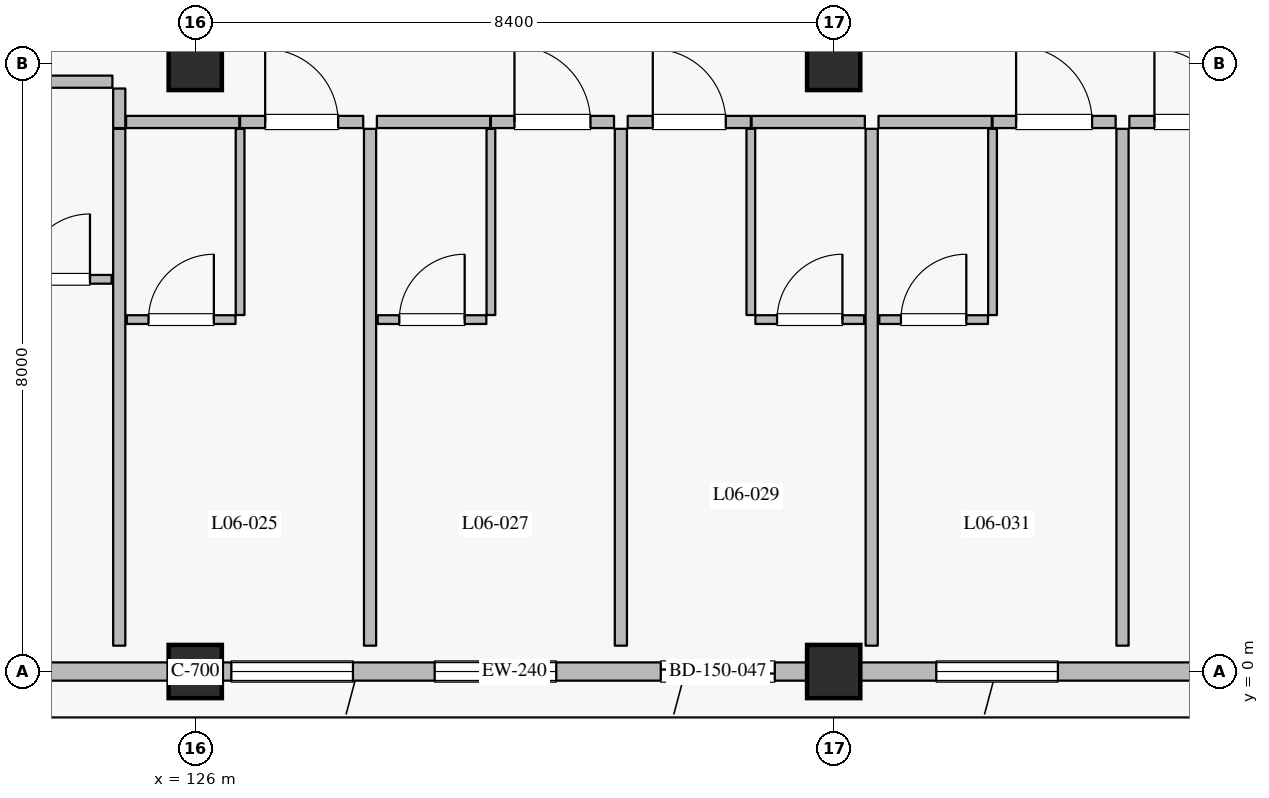
"""IFC4 building model, lengths in metres.
Left out: names, types, materials, properties, quantities, classifications, styles, units other than length and angle.
Written with IfcOpenShell. Run it as: python <this file> out.ifc"""

import sys

from ifc_helpers import new_model, si_unit, direction, frame, frame_2d, origin, origin_2d, place, context, subcontext, project, spatial, rectangle, extrude, element, fill, save


model = new_model("IFC4")
c1 = context("Model", 3, precision=1e-05, world=origin(), true_north=direction((0.0, 1.0)))
c2 = subcontext(c1, "Body", "Model", "MODEL_VIEW")
j1 = project(units=[si_unit("LENGTHUNIT", "METRE"), si_unit("PLANEANGLEUNIT", "RADIAN")], contexts=[c1])
p1 = place(None, origin())
s1 = spatial("IfcSite", under=j1, at=p1, CompositionType="ELEMENT")
p2 = place(p1, origin())
s2 = spatial("IfcBuilding", under=s1, at=p2, CompositionType="ELEMENT")
p3 = place(p2, frame((0.0, 0.0, 28.8)))
s3 = spatial("IfcBuildingStorey", under=s2, at=p3, CompositionType="ELEMENT", Elevation=28.8)
for number, where, z_axis, x_axis in (
    (1, (126.0, 0.0, 0.0), (0.0, 0.0, 1.0), (1.0, 0.0, 0.0)),
    (2, (134.4, 0.0, 0.0), (0.0, 0.0, 1.0), (1.0, 0.0, 0.0)),
    (3, (126.0, 8.0, 0.0), (0.0, 0.0, 1.0), (1.0, 0.0, 0.0)),
    (4, (134.4, 8.0, 0.0), (0.0, 0.0, 1.0), (1.0, 0.0, 0.0)),
):
    element("IfcColumn", number, at=place(p3, frame(where, z_axis=z_axis, x_axis=x_axis)), inside=s3, PredefinedType="COLUMN", context=c2, shape_type="SweptSolid", body=[
        extrude(rectangle(XDim=0.7, YDim=0.7, at=origin_2d()), origin(), (0.0, 0.0, 1.0), 3.6),
    ])
p4 = place(p3, frame((125.65, 0.0, 0.0), z_axis=(0.0, 0.0, 1.0), x_axis=(-1.0, 0.0, 0.0)))
e5 = element("IfcWall", 5, at=p4, inside=s3, PredefinedType="SOLIDWALL", context=c2, shape_type="SweptSolid", body=[
    extrude(rectangle(XDim=7.7, YDim=0.24, at=frame_2d((3.85, 0.0))), origin(), (0.0, 0.0, 1.0), 2.93),
])
p5 = place(p4, frame((1.55, 0.0, 0.0)))
e6 = element("IfcOpeningElement", 6, at=p5, cuts=e5, PredefinedType="OPENING", context=c2, shape_type="SweptSolid", body=[
    extrude(rectangle(XDim=1.5, YDim=2.25, at=frame_2d((0.75, 1.125))), frame((0.0, 0.13, 0.0), z_axis=(0.0, -1.0, 0.0), x_axis=(1.0, 0.0, 0.0)), (0.0, 0.0, 1.0), 0.26),
])
p6 = place(p4, frame((4.8, 0.0, 0.8)))
e7 = element("IfcOpeningElement", 7, at=p6, cuts=e5, PredefinedType="OPENING", context=c2, shape_type="SweptSolid", body=[
    extrude(rectangle(XDim=1.6, YDim=1.6, at=frame_2d((0.8, 0.8))), frame((0.0, 0.13, 0.0), z_axis=(0.0, -1.0, 0.0), x_axis=(1.0, 0.0, 0.0)), (0.0, 0.0, 1.0), 0.26),
])
p7 = place(p3, frame((134.05, 0.0, 0.0), z_axis=(0.0, 0.0, 1.0), x_axis=(-1.0, 0.0, 0.0)))
e8 = element("IfcWall", 8, at=p7, inside=s3, PredefinedType="SOLIDWALL", context=c2, shape_type="SweptSolid", body=[
    extrude(rectangle(XDim=7.7, YDim=0.24, at=frame_2d((3.85, 0.0))), origin(), (0.0, 0.0, 1.0), 2.93),
])
p8 = place(p7, frame((0.425, 0.0, 0.0)))
e9 = element("IfcOpeningElement", 9, at=p8, cuts=e8, PredefinedType="OPENING", context=c2, shape_type="SweptSolid", body=[
    extrude(rectangle(XDim=1.5, YDim=2.25, at=frame_2d((0.75, 1.125))), frame((0.0, 0.13, 0.0), z_axis=(0.0, -1.0, 0.0), x_axis=(1.0, 0.0, 0.0)), (0.0, 0.0, 1.0), 0.26),
])
p9 = place(p7, frame((3.3, 0.0, 0.8)))
e10 = element("IfcOpeningElement", 10, at=p9, cuts=e8, PredefinedType="OPENING", context=c2, shape_type="SweptSolid", body=[
    extrude(rectangle(XDim=1.6, YDim=1.6, at=frame_2d((0.8, 0.8))), frame((0.0, 0.13, 0.0), z_axis=(0.0, -1.0, 0.0), x_axis=(1.0, 0.0, 0.0)), (0.0, 0.0, 1.0), 0.26),
])
p10 = place(p7, frame((5.975, 0.0, 0.8)))
e11 = element("IfcOpeningElement", 11, at=p10, cuts=e8, PredefinedType="OPENING", context=c2, shape_type="SweptSolid", body=[
    extrude(rectangle(XDim=1.6, YDim=1.6, at=frame_2d((0.8, 0.8))), frame((0.0, 0.13, 0.0), z_axis=(0.0, -1.0, 0.0), x_axis=(1.0, 0.0, 0.0)), (0.0, 0.0, 1.0), 0.26),
])
p11 = place(p3, frame((142.45, 0.0, 0.0), z_axis=(0.0, 0.0, 1.0), x_axis=(-1.0, 0.0, 0.0)))
e12 = element("IfcWall", 12, at=p11, inside=s3, PredefinedType="SOLIDWALL", context=c2, shape_type="SweptSolid", body=[
    extrude(rectangle(XDim=7.7, YDim=0.24, at=frame_2d((3.85, 0.0))), origin(), (0.0, 0.0, 1.0), 2.93),
])
p12 = place(p11, frame((1.85, 0.0, 0.0)))
e13 = element("IfcOpeningElement", 13, at=p12, cuts=e12, PredefinedType="OPENING", context=c2, shape_type="SweptSolid", body=[
    extrude(rectangle(XDim=1.5, YDim=2.25, at=frame_2d((0.75, 1.125))), frame((0.0, 0.13, 0.0), z_axis=(0.0, -1.0, 0.0), x_axis=(1.0, 0.0, 0.0)), (0.0, 0.0, 1.0), 0.26),
])
p13 = place(p11, frame((5.1, 0.0, 0.8)))
e14 = element("IfcOpeningElement", 14, at=p13, cuts=e12, PredefinedType="OPENING", context=c2, shape_type="SweptSolid", body=[
    extrude(rectangle(XDim=1.6, YDim=1.6, at=frame_2d((0.8, 0.8))), frame((0.0, 0.13, 0.0), z_axis=(0.0, -1.0, 0.0), x_axis=(1.0, 0.0, 0.0)), (0.0, 0.0, 1.0), 0.26),
])
p14 = place(p3, frame((123.42, 7.76, 0.0), z_axis=(0.0, 0.0, 1.0), x_axis=(1.0, 0.0, 0.0)))
e15 = element("IfcWall", 15, at=p14, inside=s3, PredefinedType="PARTITIONING", context=c2, shape_type="SweptSolid", body=[
    extrude(rectangle(XDim=1.49, YDim=0.16, at=frame_2d((0.745, 0.0))), origin(), (0.0, 0.0, 1.0), 3.365),
])
p15 = place(p3, frame((123.47, 5.16, 0.0), z_axis=(0.0, 0.0, 1.0), x_axis=(1.0, 0.0, 0.0)))
e16 = element("IfcWall", 16, at=p15, inside=s3, PredefinedType="PARTITIONING", context=c2, shape_type="SweptSolid", body=[
    extrude(rectangle(XDim=1.43, YDim=0.115, at=frame_2d((0.715, 0.0))), origin(), (0.0, 0.0, 1.0), 3.365),
])
p16 = place(p15, frame((0.285, 0.0, 0.0)))
e17 = element("IfcOpeningElement", 17, at=p16, cuts=e16, PredefinedType="OPENING", context=c2, shape_type="SweptSolid", body=[
    extrude(rectangle(XDim=0.86, YDim=2.12, at=frame_2d((0.43, 1.06))), frame((0.0, 0.067, 0.0), z_axis=(0.0, -1.0, 0.0), x_axis=(1.0, 0.0, 0.0)), (0.0, 0.0, 1.0), 0.135),
])
p17 = place(p3, frame((125.0, 7.15, 0.0), z_axis=(0.0, 0.0, 1.0), x_axis=(0.0, 1.0, 0.0)))
e18 = element("IfcWall", 18, at=p17, inside=s3, PredefinedType="PARTITIONING", context=c2, shape_type="SweptSolid", body=[
    extrude(rectangle(XDim=0.52, YDim=0.16, at=frame_2d((0.26, 0.0))), origin(), (0.0, 0.0, 1.0), 3.365),
])
p18 = place(p3, frame((125.09, 7.23, 0.0), z_axis=(0.0, 0.0, 1.0), x_axis=(1.0, 0.0, 0.0)))
e19 = element("IfcWall", 19, at=p18, inside=s3, PredefinedType="PARTITIONING", context=c2, shape_type="SweptSolid", body=[
    extrude(rectangle(XDim=1.49, YDim=0.16, at=frame_2d((0.745, 0.0))), origin(), (0.0, 0.0, 1.0), 3.365),
])
p19 = place(p3, frame((126.59, 7.23, 0.0), z_axis=(0.0, 0.0, 1.0), x_axis=(1.0, 0.0, 0.0)))
e20 = element("IfcWall", 20, at=p19, inside=s3, PredefinedType="PARTITIONING", context=c2, shape_type="SweptSolid", body=[
    extrude(rectangle(XDim=1.62, YDim=0.16, at=frame_2d((0.81, 0.0))), origin(), (0.0, 0.0, 1.0), 3.365),
])
p20 = place(p19, frame((0.33, 0.0, 0.0)))
e21 = element("IfcOpeningElement", 21, at=p20, cuts=e20, PredefinedType="OPENING", context=c2, shape_type="SweptSolid", body=[
    extrude(rectangle(XDim=0.96, YDim=2.2, at=frame_2d((0.48, 1.1))), frame((0.0, 0.09, 0.0), z_axis=(0.0, -1.0, 0.0), x_axis=(1.0, 0.0, 0.0)), (0.0, 0.0, 1.0), 0.18),
])
p21 = place(p3, frame((126.59, 4.69, 0.0), z_axis=(0.0, 0.0, 1.0), x_axis=(0.0, 1.0, 0.0)))
e22 = element("IfcWall", 22, at=p21, inside=s3, PredefinedType="PARTITIONING", context=c2, shape_type="SweptSolid", body=[
    extrude(rectangle(XDim=2.45, YDim=0.115, at=frame_2d((1.225, 0.0))), origin(), (0.0, 0.0, 1.0), 3.365),
])
p22 = place(p3, frame((125.1, 4.63, 0.0), z_axis=(0.0, 0.0, 1.0), x_axis=(1.0, 0.0, 0.0)))
e23 = element("IfcWall", 23, at=p22, inside=s3, PredefinedType="PARTITIONING", context=c2, shape_type="SweptSolid", body=[
    extrude(rectangle(XDim=1.43, YDim=0.115, at=frame_2d((0.715, 0.0))), origin(), (0.0, 0.0, 1.0), 3.365),
])
p23 = place(p22, frame((0.285, 0.0, 0.0)))
e24 = element("IfcOpeningElement", 24, at=p23, cuts=e23, PredefinedType="OPENING", context=c2, shape_type="SweptSolid", body=[
    extrude(rectangle(XDim=0.86, YDim=2.12, at=frame_2d((0.43, 1.06))), frame((0.0, 0.067, 0.0), z_axis=(0.0, -1.0, 0.0), x_axis=(1.0, 0.0, 0.0)), (0.0, 0.0, 1.0), 0.135),
])
p24 = place(p3, frame((125.0, 0.34, 0.0), z_axis=(0.0, 0.0, 1.0), x_axis=(0.0, 1.0, 0.0)))
e25 = element("IfcWall", 25, at=p24, inside=s3, PredefinedType="PARTITIONING", context=c2, shape_type="SweptSolid", body=[
    extrude(rectangle(XDim=6.8, YDim=0.16, at=frame_2d((3.4, 0.0))), origin(), (0.0, 0.0, 1.0), 3.365),
])
p25 = place(p3, frame((128.39, 7.23, 0.0), z_axis=(0.0, 0.0, 1.0), x_axis=(1.0, 0.0, 0.0)))
e26 = element("IfcWall", 26, at=p25, inside=s3, PredefinedType="PARTITIONING", context=c2, shape_type="SweptSolid", body=[
    extrude(rectangle(XDim=1.49, YDim=0.16, at=frame_2d((0.745, 0.0))), origin(), (0.0, 0.0, 1.0), 3.365),
])
p26 = place(p3, frame((129.89, 7.23, 0.0), z_axis=(0.0, 0.0, 1.0), x_axis=(1.0, 0.0, 0.0)))
e27 = element("IfcWall", 27, at=p26, inside=s3, PredefinedType="PARTITIONING", context=c2, shape_type="SweptSolid", body=[
    extrude(rectangle(XDim=1.62, YDim=0.16, at=frame_2d((0.81, 0.0))), origin(), (0.0, 0.0, 1.0), 3.365),
])
p27 = place(p26, frame((0.31, 0.0, 0.0)))
e28 = element("IfcOpeningElement", 28, at=p27, cuts=e27, PredefinedType="OPENING", context=c2, shape_type="SweptSolid", body=[
    extrude(rectangle(XDim=1.0, YDim=2.25, at=frame_2d((0.5, 1.125))), frame((0.0, 0.09, 0.0), z_axis=(0.0, -1.0, 0.0), x_axis=(1.0, 0.0, 0.0)), (0.0, 0.0, 1.0), 0.18),
])
p28 = place(p3, frame((129.89, 4.69, 0.0), z_axis=(0.0, 0.0, 1.0), x_axis=(0.0, 1.0, 0.0)))
e29 = element("IfcWall", 29, at=p28, inside=s3, PredefinedType="PARTITIONING", context=c2, shape_type="SweptSolid", body=[
    extrude(rectangle(XDim=2.45, YDim=0.115, at=frame_2d((1.225, 0.0))), origin(), (0.0, 0.0, 1.0), 3.365),
])
p29 = place(p3, frame((128.4, 4.63, 0.0), z_axis=(0.0, 0.0, 1.0), x_axis=(1.0, 0.0, 0.0)))
e30 = element("IfcWall", 30, at=p29, inside=s3, PredefinedType="PARTITIONING", context=c2, shape_type="SweptSolid", body=[
    extrude(rectangle(XDim=1.43, YDim=0.115, at=frame_2d((0.715, 0.0))), origin(), (0.0, 0.0, 1.0), 3.365),
])
p30 = place(p29, frame((0.285, 0.0, 0.0)))
e31 = element("IfcOpeningElement", 31, at=p30, cuts=e30, PredefinedType="OPENING", context=c2, shape_type="SweptSolid", body=[
    extrude(rectangle(XDim=0.86, YDim=2.12, at=frame_2d((0.43, 1.06))), frame((0.0, 0.067, 0.0), z_axis=(0.0, -1.0, 0.0), x_axis=(1.0, 0.0, 0.0)), (0.0, 0.0, 1.0), 0.135),
])
p31 = place(p3, frame((128.3, 0.34, 0.0), z_axis=(0.0, 0.0, 1.0), x_axis=(0.0, 1.0, 0.0)))
e32 = element("IfcWall", 32, at=p31, inside=s3, PredefinedType="PARTITIONING", context=c2, shape_type="SweptSolid", body=[
    extrude(rectangle(XDim=6.8, YDim=0.16, at=frame_2d((3.4, 0.0))), origin(), (0.0, 0.0, 1.0), 3.365),
])
p32 = place(p3, frame((131.69, 7.23, 0.0), z_axis=(0.0, 0.0, 1.0), x_axis=(1.0, 0.0, 0.0)))
e33 = element("IfcWall", 33, at=p32, inside=s3, PredefinedType="PARTITIONING", context=c2, shape_type="SweptSolid", body=[
    extrude(rectangle(XDim=1.62, YDim=0.16, at=frame_2d((0.81, 0.0))), origin(), (0.0, 0.0, 1.0), 3.365),
])
p33 = place(p32, frame((0.33, 0.0, 0.0)))
e34 = element("IfcOpeningElement", 34, at=p33, cuts=e33, PredefinedType="OPENING", context=c2, shape_type="SweptSolid", body=[
    extrude(rectangle(XDim=0.96, YDim=2.2, at=frame_2d((0.48, 1.1))), frame((0.0, 0.09, 0.0), z_axis=(0.0, -1.0, 0.0), x_axis=(1.0, 0.0, 0.0)), (0.0, 0.0, 1.0), 0.18),
])
p34 = place(p3, frame((133.32, 7.23, 0.0), z_axis=(0.0, 0.0, 1.0), x_axis=(1.0, 0.0, 0.0)))
e35 = element("IfcWall", 35, at=p34, inside=s3, PredefinedType="PARTITIONING", context=c2, shape_type="SweptSolid", body=[
    extrude(rectangle(XDim=1.49, YDim=0.16, at=frame_2d((0.745, 0.0))), origin(), (0.0, 0.0, 1.0), 3.365),
])
p35 = place(p3, frame((133.31, 4.69, 0.0), z_axis=(0.0, 0.0, 1.0), x_axis=(0.0, 1.0, 0.0)))
e36 = element("IfcWall", 36, at=p35, inside=s3, PredefinedType="PARTITIONING", context=c2, shape_type="SweptSolid", body=[
    extrude(rectangle(XDim=2.45, YDim=0.115, at=frame_2d((1.225, 0.0))), origin(), (0.0, 0.0, 1.0), 3.365),
])
p36 = place(p3, frame((133.37, 4.63, 0.0), z_axis=(0.0, 0.0, 1.0), x_axis=(1.0, 0.0, 0.0)))
e37 = element("IfcWall", 37, at=p36, inside=s3, PredefinedType="PARTITIONING", context=c2, shape_type="SweptSolid", body=[
    extrude(rectangle(XDim=1.43, YDim=0.115, at=frame_2d((0.715, 0.0))), origin(), (0.0, 0.0, 1.0), 3.365),
])
p37 = place(p36, frame((0.285, 0.0, 0.0)))
e38 = element("IfcOpeningElement", 38, at=p37, cuts=e37, PredefinedType="OPENING", context=c2, shape_type="SweptSolid", body=[
    extrude(rectangle(XDim=0.86, YDim=2.12, at=frame_2d((0.43, 1.06))), frame((0.0, 0.067, 0.0), z_axis=(0.0, -1.0, 0.0), x_axis=(1.0, 0.0, 0.0)), (0.0, 0.0, 1.0), 0.135),
])
p38 = place(p3, frame((131.6, 0.34, 0.0), z_axis=(0.0, 0.0, 1.0), x_axis=(0.0, 1.0, 0.0)))
e39 = element("IfcWall", 39, at=p38, inside=s3, PredefinedType="PARTITIONING", context=c2, shape_type="SweptSolid", body=[
    extrude(rectangle(XDim=6.8, YDim=0.16, at=frame_2d((3.4, 0.0))), origin(), (0.0, 0.0, 1.0), 3.365),
])
p39 = place(p3, frame((134.99, 7.23, 0.0), z_axis=(0.0, 0.0, 1.0), x_axis=(1.0, 0.0, 0.0)))
e40 = element("IfcWall", 40, at=p39, inside=s3, PredefinedType="PARTITIONING", context=c2, shape_type="SweptSolid", body=[
    extrude(rectangle(XDim=1.49, YDim=0.16, at=frame_2d((0.745, 0.0))), origin(), (0.0, 0.0, 1.0), 3.365),
])
p40 = place(p3, frame((136.49, 7.23, 0.0), z_axis=(0.0, 0.0, 1.0), x_axis=(1.0, 0.0, 0.0)))
e41 = element("IfcWall", 41, at=p40, inside=s3, PredefinedType="PARTITIONING", context=c2, shape_type="SweptSolid", body=[
    extrude(rectangle(XDim=1.62, YDim=0.16, at=frame_2d((0.81, 0.0))), origin(), (0.0, 0.0, 1.0), 3.365),
])
p41 = place(p40, frame((0.31, 0.0, 0.0)))
e42 = element("IfcOpeningElement", 42, at=p41, cuts=e41, PredefinedType="OPENING", context=c2, shape_type="SweptSolid", body=[
    extrude(rectangle(XDim=1.0, YDim=2.25, at=frame_2d((0.5, 1.125))), frame((0.0, 0.09, 0.0), z_axis=(0.0, -1.0, 0.0), x_axis=(1.0, 0.0, 0.0)), (0.0, 0.0, 1.0), 0.18),
])
p42 = place(p3, frame((136.49, 4.69, 0.0), z_axis=(0.0, 0.0, 1.0), x_axis=(0.0, 1.0, 0.0)))
e43 = element("IfcWall", 43, at=p42, inside=s3, PredefinedType="PARTITIONING", context=c2, shape_type="SweptSolid", body=[
    extrude(rectangle(XDim=2.45, YDim=0.115, at=frame_2d((1.225, 0.0))), origin(), (0.0, 0.0, 1.0), 3.365),
])
p43 = place(p3, frame((135.0, 4.63, 0.0), z_axis=(0.0, 0.0, 1.0), x_axis=(1.0, 0.0, 0.0)))
e44 = element("IfcWall", 44, at=p43, inside=s3, PredefinedType="PARTITIONING", context=c2, shape_type="SweptSolid", body=[
    extrude(rectangle(XDim=1.43, YDim=0.115, at=frame_2d((0.715, 0.0))), origin(), (0.0, 0.0, 1.0), 3.365),
])
p44 = place(p43, frame((0.285, 0.0, 0.0)))
e45 = element("IfcOpeningElement", 45, at=p44, cuts=e44, PredefinedType="OPENING", context=c2, shape_type="SweptSolid", body=[
    extrude(rectangle(XDim=0.86, YDim=2.12, at=frame_2d((0.43, 1.06))), frame((0.0, 0.067, 0.0), z_axis=(0.0, -1.0, 0.0), x_axis=(1.0, 0.0, 0.0)), (0.0, 0.0, 1.0), 0.135),
])
p45 = place(p3, frame((134.9, 0.34, 0.0), z_axis=(0.0, 0.0, 1.0), x_axis=(0.0, 1.0, 0.0)))
e46 = element("IfcWall", 46, at=p45, inside=s3, PredefinedType="PARTITIONING", context=c2, shape_type="SweptSolid", body=[
    extrude(rectangle(XDim=6.8, YDim=0.16, at=frame_2d((3.4, 0.0))), origin(), (0.0, 0.0, 1.0), 3.365),
])
p46 = place(p3, frame((138.29, 7.23, 0.0), z_axis=(0.0, 0.0, 1.0), x_axis=(1.0, 0.0, 0.0)))
e47 = element("IfcWall", 47, at=p46, inside=s3, PredefinedType="PARTITIONING", context=c2, shape_type="SweptSolid", body=[
    extrude(rectangle(XDim=1.62, YDim=0.16, at=frame_2d((0.81, 0.0))), origin(), (0.0, 0.0, 1.0), 3.365),
])
p47 = place(p46, frame((0.33, 0.0, 0.0)))
e48 = element("IfcOpeningElement", 48, at=p47, cuts=e47, PredefinedType="OPENING", context=c2, shape_type="SweptSolid", body=[
    extrude(rectangle(XDim=0.96, YDim=2.2, at=frame_2d((0.48, 1.1))), frame((0.0, 0.09, 0.0), z_axis=(0.0, -1.0, 0.0), x_axis=(1.0, 0.0, 0.0)), (0.0, 0.0, 1.0), 0.18),
])
p48 = place(p3, frame((138.2, 0.34, 0.0), z_axis=(0.0, 0.0, 1.0), x_axis=(0.0, 1.0, 0.0)))
e49 = element("IfcWall", 49, at=p48, inside=s3, PredefinedType="PARTITIONING", context=c2, shape_type="SweptSolid", body=[
    extrude(rectangle(XDim=6.8, YDim=0.16, at=frame_2d((3.4, 0.0))), origin(), (0.0, 0.0, 1.0), 3.365),
])
p49 = place(p8, origin())
e50 = element("IfcDoor", 50, at=p49, inside=s3, OperationType="SLIDING_TO_LEFT", PredefinedType="DOOR", context=c2, shape_type="SweptSolid", body=[
    extrude(rectangle(XDim=1.5, YDim=2.25, at=frame_2d((0.75, 1.125))), frame((0.0, 0.025, 0.0), z_axis=(0.0, -1.0, 0.0), x_axis=(1.0, 0.0, 0.0)), (0.0, 0.0, 1.0), 0.05),
])
fill(e9, e50)
p50 = place(p9, origin())
e51 = element("IfcWindow", 51, at=p50, inside=s3, PartitioningType="SINGLE_PANEL", PredefinedType="WINDOW", context=c2, shape_type="SweptSolid", body=[
    extrude(rectangle(XDim=1.6, YDim=1.6, at=frame_2d((0.8, 0.8))), frame((0.0, 0.03, 0.0), z_axis=(0.0, -1.0, 0.0), x_axis=(1.0, 0.0, 0.0)), (0.0, 0.0, 1.0), 0.06),
])
fill(e10, e51)
p51 = place(p10, origin())
e52 = element("IfcWindow", 52, at=p51, inside=s3, PartitioningType="SINGLE_PANEL", PredefinedType="WINDOW", context=c2, shape_type="SweptSolid", body=[
    extrude(rectangle(XDim=1.6, YDim=1.6, at=frame_2d((0.8, 0.8))), frame((0.0, 0.03, 0.0), z_axis=(0.0, -1.0, 0.0), x_axis=(1.0, 0.0, 0.0)), (0.0, 0.0, 1.0), 0.06),
])
fill(e11, e52)
p52 = place(p13, origin())
e53 = element("IfcWindow", 53, at=p52, inside=s3, PartitioningType="SINGLE_PANEL", PredefinedType="WINDOW", context=c2, shape_type="SweptSolid", body=[
    extrude(rectangle(XDim=1.6, YDim=1.6, at=frame_2d((0.8, 0.8))), frame((0.0, 0.03, 0.0), z_axis=(0.0, -1.0, 0.0), x_axis=(1.0, 0.0, 0.0)), (0.0, 0.0, 1.0), 0.06),
])
fill(e14, e53)
p53 = place(p16, origin())
e54 = element("IfcDoor", 54, at=p53, inside=s3, OperationType="SINGLE_SWING_RIGHT", PredefinedType="DOOR", context=c2, shape_type="SweptSolid", body=[
    extrude(rectangle(XDim=0.86, YDim=2.12, at=frame_2d((0.43, 1.06))), frame((0.0, 0.025, 0.0), z_axis=(0.0, -1.0, 0.0), x_axis=(1.0, 0.0, 0.0)), (0.0, 0.0, 1.0), 0.05),
])
fill(e17, e54)
p54 = place(p20, origin())
e55 = element("IfcDoor", 55, at=p54, inside=s3, OperationType="SINGLE_SWING_LEFT", PredefinedType="DOOR", context=c2, shape_type="SweptSolid", body=[
    extrude(rectangle(XDim=0.96, YDim=2.2, at=frame_2d((0.48, 1.1))), frame((0.0, 0.025, 0.0), z_axis=(0.0, -1.0, 0.0), x_axis=(1.0, 0.0, 0.0)), (0.0, 0.0, 1.0), 0.05),
])
fill(e21, e55)
p55 = place(p23, origin())
e56 = element("IfcDoor", 56, at=p55, inside=s3, OperationType="SINGLE_SWING_RIGHT", PredefinedType="DOOR", context=c2, shape_type="SweptSolid", body=[
    extrude(rectangle(XDim=0.86, YDim=2.12, at=frame_2d((0.43, 1.06))), frame((0.0, 0.025, 0.0), z_axis=(0.0, -1.0, 0.0), x_axis=(1.0, 0.0, 0.0)), (0.0, 0.0, 1.0), 0.05),
])
fill(e24, e56)
p56 = place(p27, origin())
e57 = element("IfcDoor", 57, at=p56, inside=s3, OperationType="SINGLE_SWING_LEFT", PredefinedType="DOOR", context=c2, shape_type="SweptSolid", body=[
    extrude(rectangle(XDim=1.0, YDim=2.25, at=frame_2d((0.5, 1.125))), frame((0.0, 0.025, 0.0), z_axis=(0.0, -1.0, 0.0), x_axis=(1.0, 0.0, 0.0)), (0.0, 0.0, 1.0), 0.05),
])
fill(e28, e57)
p57 = place(p30, origin())
e58 = element("IfcDoor", 58, at=p57, inside=s3, OperationType="SINGLE_SWING_RIGHT", PredefinedType="DOOR", context=c2, shape_type="SweptSolid", body=[
    extrude(rectangle(XDim=0.86, YDim=2.12, at=frame_2d((0.43, 1.06))), frame((0.0, 0.025, 0.0), z_axis=(0.0, -1.0, 0.0), x_axis=(1.0, 0.0, 0.0)), (0.0, 0.0, 1.0), 0.05),
])
fill(e31, e58)
p58 = place(p33, origin())
e59 = element("IfcDoor", 59, at=p58, inside=s3, OperationType="SINGLE_SWING_LEFT", PredefinedType="DOOR", context=c2, shape_type="SweptSolid", body=[
    extrude(rectangle(XDim=0.96, YDim=2.2, at=frame_2d((0.48, 1.1))), frame((0.0, 0.025, 0.0), z_axis=(0.0, -1.0, 0.0), x_axis=(1.0, 0.0, 0.0)), (0.0, 0.0, 1.0), 0.05),
])
fill(e34, e59)
p59 = place(p37, origin())
e60 = element("IfcDoor", 60, at=p59, inside=s3, OperationType="SINGLE_SWING_RIGHT", PredefinedType="DOOR", context=c2, shape_type="SweptSolid", body=[
    extrude(rectangle(XDim=0.86, YDim=2.12, at=frame_2d((0.43, 1.06))), frame((0.0, 0.025, 0.0), z_axis=(0.0, -1.0, 0.0), x_axis=(1.0, 0.0, 0.0)), (0.0, 0.0, 1.0), 0.05),
])
fill(e38, e60)
p60 = place(p41, origin())
e61 = element("IfcDoor", 61, at=p60, inside=s3, OperationType="SINGLE_SWING_LEFT", PredefinedType="DOOR", context=c2, shape_type="SweptSolid", body=[
    extrude(rectangle(XDim=1.0, YDim=2.25, at=frame_2d((0.5, 1.125))), frame((0.0, 0.025, 0.0), z_axis=(0.0, -1.0, 0.0), x_axis=(1.0, 0.0, 0.0)), (0.0, 0.0, 1.0), 0.05),
])
fill(e42, e61)
p61 = place(p44, origin())
e62 = element("IfcDoor", 62, at=p61, inside=s3, OperationType="SINGLE_SWING_RIGHT", PredefinedType="DOOR", context=c2, shape_type="SweptSolid", body=[
    extrude(rectangle(XDim=0.86, YDim=2.12, at=frame_2d((0.43, 1.06))), frame((0.0, 0.025, 0.0), z_axis=(0.0, -1.0, 0.0), x_axis=(1.0, 0.0, 0.0)), (0.0, 0.0, 1.0), 0.05),
])
fill(e45, e62)
p62 = place(p47, origin())
e63 = element("IfcDoor", 63, at=p62, inside=s3, OperationType="SINGLE_SWING_LEFT", PredefinedType="DOOR", context=c2, shape_type="SweptSolid", body=[
    extrude(rectangle(XDim=0.96, YDim=2.2, at=frame_2d((0.48, 1.1))), frame((0.0, 0.025, 0.0), z_axis=(0.0, -1.0, 0.0), x_axis=(1.0, 0.0, 0.0)), (0.0, 0.0, 1.0), 0.05),
])
fill(e48, e63)
save(model, sys.argv[1])
